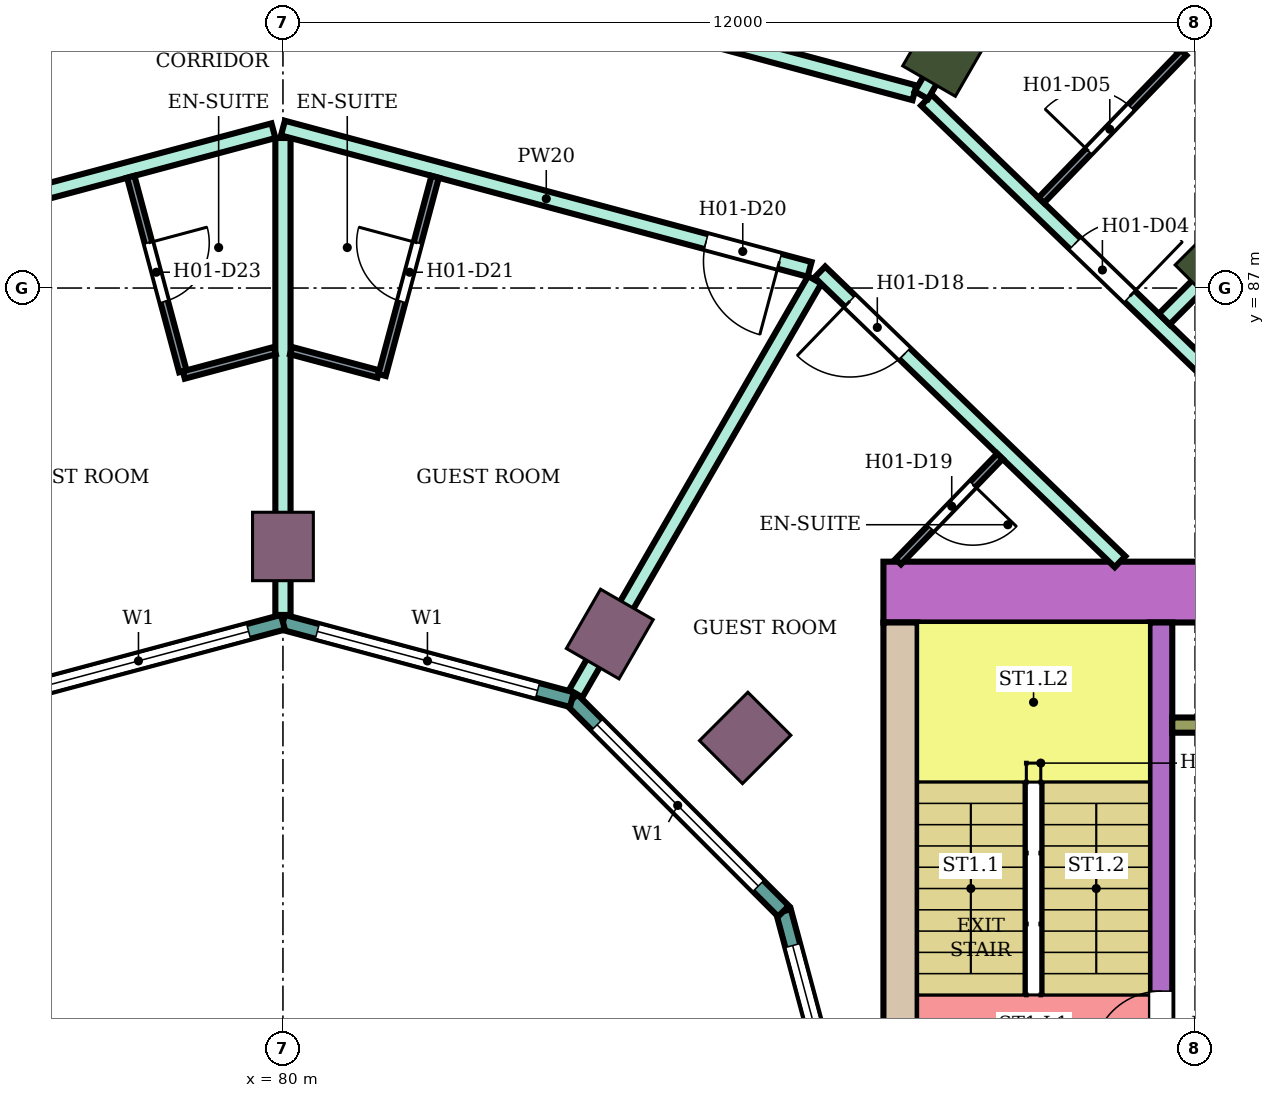
"""IFC4 building model, lengths in metres.
Left out: names, types, materials, properties, quantities, classifications, styles, units other than length and angle.
Written with IfcOpenShell. Run it as: python <this file> out.ifc"""

import sys

from ifc_helpers import new_model, si_unit, direction, frame, frame_2d, origin, origin_2d, place, context, subcontext, project, spatial, rectangle, extrude, element, fill, save


model = new_model("IFC4")
c1 = context("Model", 3, precision=1e-05, world=origin(), true_north=direction((0.0, 1.0)))
c2 = subcontext(c1, "Body", "Model", "MODEL_VIEW")
j1 = project(units=[si_unit("LENGTHUNIT", "METRE"), si_unit("PLANEANGLEUNIT", "RADIAN")], contexts=[c1])
p1 = place(None, origin())
s1 = spatial("IfcSite", under=j1, at=p1, CompositionType="ELEMENT")
p2 = place(p1, origin())
s2 = spatial("IfcBuilding", under=s1, at=p2, CompositionType="ELEMENT")
p3 = place(p2, frame((0.0, 0.0, 36.4)))
s3 = spatial("IfcBuildingStorey", under=s2, at=p3, CompositionType="ELEMENT", Elevation=36.4)
for number, where, z_axis, x_axis in (
    (1, (92.445, 87.445, 0.0), (0.0, 0.0, 1.0), (0.707, 0.707, 0.0)),
    (2, (88.8, 90.242, 0.0), (0.0, 0.0, 1.0), (0.5, 0.866, 0.0)),
):
    element("IfcColumn", number, at=place(p3, frame(where, z_axis=z_axis, x_axis=x_axis)), inside=s3, PredefinedType="COLUMN", context=c2, shape_type="SweptSolid", body=[
        extrude(rectangle(XDim=1.2, YDim=0.8, at=origin_2d()), origin(), (0.0, 0.0, 1.0), 3.8),
    ])
for number, where, z_axis, x_axis in (
    (3, (86.081, 81.081, 0.0), (0.0, 0.0, 1.0), (0.707, 0.707, 0.0)),
    (4, (84.3, 82.448, 0.0), (0.0, 0.0, 1.0), (0.5, 0.866, 0.0)),
    (5, (80.0, 83.6, 0.0), (0.0, 0.0, 1.0), (0.0, 1.0, 0.0)),
):
    element("IfcColumn", number, at=place(p3, frame(where, z_axis=z_axis, x_axis=x_axis)), inside=s3, PredefinedType="COLUMN", context=c2, shape_type="SweptSolid", body=[
        extrude(rectangle(XDim=0.9, YDim=0.8, at=origin_2d()), origin(), (0.0, 0.0, 1.0), 3.8),
    ])
p4 = place(p3, frame((87.9, 83.0, 0.0), z_axis=(0.0, 0.0, 1.0), x_axis=(1.0, 0.0, 0.0)))
e6 = element("IfcWall", 6, at=p4, inside=s3, PredefinedType="SHEAR", context=c2, shape_type="SweptSolid", body=[
    extrude(rectangle(XDim=14.7, YDim=0.8, at=frame_2d((7.35, 0.0))), origin(), (0.0, 0.0, 1.0), 3.48),
])
p5 = place(p4, frame((4.2, 0.0, 0.0)))
e7 = element("IfcOpeningElement", 7, at=p5, cuts=e6, PredefinedType="OPENING", context=c2, shape_type="SweptSolid", body=[
    extrude(rectangle(XDim=2.4, YDim=2.4, at=frame_2d((1.2, 1.2))), frame((0.0, 0.41, 0.0), z_axis=(0.0, -1.0, 0.0), x_axis=(1.0, 0.0, 0.0)), (0.0, 0.0, 1.0), 0.82),
])
p6 = place(p3, frame((88.125, 75.0, 0.0), z_axis=(0.0, 0.0, 1.0), x_axis=(0.0, 1.0, 0.0)))
e8 = element("IfcWall", 8, at=p6, inside=s3, PredefinedType="SHEAR", context=c2, shape_type="SweptSolid", body=[
    extrude(rectangle(XDim=7.6, YDim=0.45, at=frame_2d((3.8, 0.0))), origin(), (0.0, 0.0, 1.0), 3.48),
])
p7 = place(p3, frame((91.55, 75.0, 0.0), z_axis=(0.0, 0.0, 1.0), x_axis=(0.0, 1.0, 0.0)))
e9 = element("IfcWall", 9, at=p7, inside=s3, PredefinedType="SHEAR", context=c2, shape_type="SweptSolid", body=[
    extrude(rectangle(XDim=7.6, YDim=0.3, at=frame_2d((3.8, 0.0))), origin(), (0.0, 0.0, 1.0), 3.48),
])
p8 = place(p7, frame((1.85, 0.0, 0.0)))
e10 = element("IfcOpeningElement", 10, at=p8, cuts=e9, PredefinedType="OPENING", context=c2, shape_type="SweptSolid", body=[
    extrude(rectangle(XDim=0.9, YDim=2.1, at=frame_2d((0.45, 1.05))), frame((0.0, 0.16, 0.0), z_axis=(0.0, -1.0, 0.0), x_axis=(1.0, 0.0, 0.0)), (0.0, 0.0, 1.0), 0.32),
])
p9 = place(p3, frame((91.7, 81.25, 0.0), z_axis=(0.0, 0.0, 1.0), x_axis=(1.0, 0.0, 0.0)))
e11 = element("IfcWall", 11, at=p9, inside=s3, PredefinedType="SHEAR", context=c2, shape_type="SweptSolid", body=[
    extrude(rectangle(XDim=4.65, YDim=0.2, at=frame_2d((2.325, 0.0))), origin(), (0.0, 0.0, 1.0), 3.48),
])
p10 = place(p3, frame((87.604, 75.0, 0.0), z_axis=(0.0, 0.0, 1.0), x_axis=(-0.258789828301, 0.965933654434, 0.0)))
e12 = element("IfcWall", 12, at=p10, inside=s3, PredefinedType="NOTDEFINED", context=c2, shape_type="SweptSolid", body=[
    extrude(rectangle(XDim=3.936, YDim=0.2, at=frame_2d((1.968, 0.0))), origin(), (0.0, 0.0, 1.0), 3.8),
])
p11 = place(p10, frame((0.468, 0.0, 0.9)))
e13 = element("IfcOpeningElement", 13, at=p11, cuts=e12, PredefinedType="OPENING", context=c2, shape_type="SweptSolid", body=[
    extrude(rectangle(XDim=3.0, YDim=2.3, at=frame_2d((1.5, 1.15))), frame((0.0, 0.11, 0.0), z_axis=(0.0, -1.0, 0.0), x_axis=(1.0, 0.0, 0.0)), (0.0, 0.0, 1.0), 0.22),
])
p12 = place(p3, frame((86.585, 78.802, 0.0), z_axis=(0.0, 0.0, 1.0), x_axis=(-0.707106781187, 0.707106781187, 0.0)))
e14 = element("IfcWall", 14, at=p12, inside=s3, PredefinedType="NOTDEFINED", context=c2, shape_type="SweptSolid", body=[
    extrude(rectangle(XDim=3.936, YDim=0.2, at=frame_2d((1.968, 0.0))), origin(), (0.0, 0.0, 1.0), 3.8),
])
p13 = place(p12, frame((0.468, 0.0, 0.9)))
e15 = element("IfcOpeningElement", 15, at=p13, cuts=e14, PredefinedType="OPENING", context=c2, shape_type="SweptSolid", body=[
    extrude(rectangle(XDim=3.0, YDim=2.3, at=frame_2d((1.5, 1.15))), frame((0.0, 0.11, 0.0), z_axis=(0.0, -1.0, 0.0), x_axis=(1.0, 0.0, 0.0)), (0.0, 0.0, 1.0), 0.22),
])
p14 = place(p3, frame((83.802, 81.585, 0.0), z_axis=(0.0, 0.0, 1.0), x_axis=(-0.965933654434, 0.258789828301, 0.0)))
e16 = element("IfcWall", 16, at=p14, inside=s3, PredefinedType="NOTDEFINED", context=c2, shape_type="SweptSolid", body=[
    extrude(rectangle(XDim=3.936, YDim=0.2, at=frame_2d((1.968, 0.0))), origin(), (0.0, 0.0, 1.0), 3.8),
])
p15 = place(p14, frame((0.468, 0.0, 0.9)))
e17 = element("IfcOpeningElement", 17, at=p15, cuts=e16, PredefinedType="OPENING", context=c2, shape_type="SweptSolid", body=[
    extrude(rectangle(XDim=3.0, YDim=2.3, at=frame_2d((1.5, 1.15))), frame((0.0, 0.11, 0.0), z_axis=(0.0, -1.0, 0.0), x_axis=(1.0, 0.0, 0.0)), (0.0, 0.0, 1.0), 0.22),
])
p16 = place(p3, frame((80.0, 82.604, 0.0), z_axis=(0.0, 0.0, 1.0), x_axis=(-0.965933654434, -0.258789828301, 0.0)))
e18 = element("IfcWall", 18, at=p16, inside=s3, PredefinedType="NOTDEFINED", context=c2, shape_type="SweptSolid", body=[
    extrude(rectangle(XDim=3.936, YDim=0.2, at=frame_2d((1.968, 0.0))), origin(), (0.0, 0.0, 1.0), 3.8),
])
p17 = place(p16, frame((0.468, 0.0, 0.9)))
e19 = element("IfcOpeningElement", 19, at=p17, cuts=e18, PredefinedType="OPENING", context=c2, shape_type="SweptSolid", body=[
    extrude(rectangle(XDim=3.0, YDim=2.3, at=frame_2d((1.5, 1.15))), frame((0.0, 0.11, 0.0), z_axis=(0.0, -1.0, 0.0), x_axis=(1.0, 0.0, 0.0)), (0.0, 0.0, 1.0), 0.22),
])
p18 = place(p3, frame((71.614, 89.55, 0.0), z_axis=(0.0, 0.0, 1.0), x_axis=(0.965982156828, 0.258608725086, 0.0)))
e20 = element("IfcWall", 20, at=p18, inside=s3, PredefinedType="PARTITIONING", context=c2, shape_type="SweptSolid", body=[
    extrude(rectangle(XDim=8.592, YDim=0.2, at=frame_2d((4.296, 0.0))), origin(), (0.0, 0.0, 1.0), 3.35),
])
p19 = place(p18, frame((4.865, 0.0, 0.0)))
e21 = element("IfcOpeningElement", 21, at=p19, cuts=e20, PredefinedType="OPENING", context=c2, shape_type="SweptSolid", body=[
    extrude(rectangle(XDim=1.0, YDim=2.1, at=frame_2d((0.5, 1.05))), frame((0.0, 0.11, 0.0), z_axis=(0.0, -1.0, 0.0), x_axis=(1.0, 0.0, 0.0)), (0.0, 0.0, 1.0), 0.22),
])
p20 = place(p18, frame((2.804, 0.0, 0.0)))
e22 = element("IfcOpeningElement", 22, at=p20, cuts=e20, PredefinedType="OPENING", context=c2, shape_type="SweptSolid", body=[
    extrude(rectangle(XDim=1.0, YDim=2.1, at=frame_2d((0.5, 1.05))), frame((0.0, 0.11, 0.0), z_axis=(0.0, -1.0, 0.0), x_axis=(1.0, 0.0, 0.0)), (0.0, 0.0, 1.0), 0.22),
])
p21 = place(p3, frame((73.071, 87.247, 0.0), z_axis=(0.0, 0.0, 1.0), x_axis=(0.965931651205, 0.258797305243, 0.0)))
e23 = element("IfcWall", 23, at=p21, inside=s3, PredefinedType="PARTITIONING", context=c2, shape_type="SweptSolid", body=[
    extrude(rectangle(XDim=7.043, YDim=0.2, at=frame_2d((3.521, 0.0))), origin(), (0.0, 0.0, 1.0), 3.35),
])
p22 = place(p21, frame((0.41, 0.0, 0.0)))
e24 = element("IfcOpeningElement", 24, at=p22, cuts=e23, PredefinedType="OPENING", context=c2, shape_type="SweptSolid", body=[
    extrude(rectangle(XDim=1.0, YDim=2.1, at=frame_2d((0.5, 1.05))), frame((0.0, 0.11, 0.0), z_axis=(0.0, -1.0, 0.0), x_axis=(1.0, 0.0, 0.0)), (0.0, 0.0, 1.0), 0.22),
])
p23 = place(p3, frame((80.0, 82.699, 0.0), z_axis=(0.0, 0.0, 1.0), x_axis=(0.0, 1.0, 0.0)))
e25 = element("IfcWall", 25, at=p23, inside=s3, PredefinedType="PARTITIONING", context=c2, shape_type="SweptSolid", body=[
    extrude(rectangle(XDim=6.275, YDim=0.2, at=frame_2d((3.138, 0.0))), origin(), (0.0, 0.0, 1.0), 3.35),
])
p24 = place(p3, frame((80.0, 89.104, 0.0), z_axis=(0.0, 0.0, 1.0), x_axis=(0.965856548257, -0.259077455964, 0.0)))
e26 = element("IfcWall", 26, at=p24, inside=s3, PredefinedType="PARTITIONING", context=c2, shape_type="SweptSolid", body=[
    extrude(rectangle(XDim=7.173, YDim=0.2, at=frame_2d((3.586, 0.0))), origin(), (0.0, 0.0, 1.0), 3.35),
])
p25 = place(p24, frame((5.763, 0.0, 0.0)))
e27 = element("IfcOpeningElement", 27, at=p25, cuts=e26, PredefinedType="OPENING", context=c2, shape_type="SweptSolid", body=[
    extrude(rectangle(XDim=1.0, YDim=2.1, at=frame_2d((0.5, 1.05))), frame((0.0, 0.11, 0.0), z_axis=(0.0, -1.0, 0.0), x_axis=(1.0, 0.0, 0.0)), (0.0, 0.0, 1.0), 0.22),
])
p26 = place(p3, frame((80.0, 91.797, 0.0), z_axis=(0.0, 0.0, 1.0), x_axis=(0.965857042792, -0.259075612301, 0.0)))
e28 = element("IfcWall", 28, at=p26, inside=s3, PredefinedType="PARTITIONING", context=c2, shape_type="SweptSolid", body=[
    extrude(rectangle(XDim=8.602, YDim=0.2, at=frame_2d((4.301, 0.0))), origin(), (0.0, 0.0, 1.0), 3.35),
])
p27 = place(p26, frame((4.877, 0.0, 0.0)))
e29 = element("IfcOpeningElement", 29, at=p27, cuts=e28, PredefinedType="OPENING", context=c2, shape_type="SweptSolid", body=[
    extrude(rectangle(XDim=1.0, YDim=2.1, at=frame_2d((0.5, 1.05))), frame((0.0, 0.11, 0.0), z_axis=(0.0, -1.0, 0.0), x_axis=(1.0, 0.0, 0.0)), (0.0, 0.0, 1.0), 0.22),
])
p28 = place(p26, frame((2.73, 0.0, 0.0)))
e30 = element("IfcOpeningElement", 30, at=p28, cuts=e28, PredefinedType="OPENING", context=c2, shape_type="SweptSolid", body=[
    extrude(rectangle(XDim=1.1, YDim=2.1, at=frame_2d((0.55, 1.05))), frame((0.0, 0.11, 0.0), z_axis=(0.0, -1.0, 0.0), x_axis=(1.0, 0.0, 0.0)), (0.0, 0.0, 1.0), 0.22),
])
p29 = place(p3, frame((83.852, 81.665, 0.0), z_axis=(0.0, 0.0, 1.0), x_axis=(0.500253653624, 0.865878907259, 0.0)))
e31 = element("IfcWall", 31, at=p29, inside=s3, PredefinedType="PARTITIONING", context=c2, shape_type="SweptSolid", body=[
    extrude(rectangle(XDim=6.285, YDim=0.2, at=frame_2d((3.143, 0.0))), origin(), (0.0, 0.0, 1.0), 3.35),
])
p30 = place(p3, frame((87.064, 87.211, 0.0), z_axis=(0.0, 0.0, 1.0), x_axis=(0.719540958932, -0.694450004262, 0.0)))
e32 = element("IfcWall", 32, at=p30, inside=s3, PredefinedType="PARTITIONING", context=c2, shape_type="SweptSolid", body=[
    extrude(rectangle(XDim=5.488, YDim=0.2, at=frame_2d((2.744, 0.0))), origin(), (0.0, 0.0, 1.0), 3.35),
])
p31 = place(p30, frame((0.55, 0.0, 0.0)))
e33 = element("IfcOpeningElement", 33, at=p31, cuts=e32, PredefinedType="OPENING", context=c2, shape_type="SweptSolid", body=[
    extrude(rectangle(XDim=1.0, YDim=2.1, at=frame_2d((0.5, 1.05))), frame((0.0, 0.11, 0.0), z_axis=(0.0, -1.0, 0.0), x_axis=(1.0, 0.0, 0.0)), (0.0, 0.0, 1.0), 0.22),
])
p32 = place(p3, frame((88.465, 89.473, 0.0), z_axis=(0.0, 0.0, 1.0), x_axis=(0.719457552421, -0.694536413922, 0.0)))
e34 = element("IfcWall", 34, at=p32, inside=s3, PredefinedType="PARTITIONING", context=c2, shape_type="SweptSolid", body=[
    extrude(rectangle(XDim=6.524, YDim=0.2, at=frame_2d((3.262, 0.0))), origin(), (0.0, 0.0, 1.0), 3.35),
])
p33 = place(p32, frame((2.719, 0.0, 0.0)))
e35 = element("IfcOpeningElement", 35, at=p33, cuts=e34, PredefinedType="OPENING", context=c2, shape_type="SweptSolid", body=[
    extrude(rectangle(XDim=1.0, YDim=2.1, at=frame_2d((0.5, 1.05))), frame((0.0, 0.11, 0.0), z_axis=(0.0, -1.0, 0.0), x_axis=(1.0, 0.0, 0.0)), (0.0, 0.0, 1.0), 0.22),
])
p34 = place(p3, frame((88.4, 89.538, 0.0), z_axis=(0.0, 0.0, 1.0), x_axis=(0.5002401188, 0.865886726739, 0.0)))
e36 = element("IfcWall", 36, at=p34, inside=s3, PredefinedType="PARTITIONING", context=c2, shape_type="SweptSolid", body=[
    extrude(rectangle(XDim=9.008, YDim=0.2, at=frame_2d((4.504, 0.0))), origin(), (0.0, 0.0, 1.0), 3.35),
])
p35 = place(p3, frame((91.594, 86.591, 0.0), z_axis=(0.0, 0.0, 1.0), x_axis=(0.707214399597, 0.706999146394, 0.0)))
e37 = element("IfcWall", 37, at=p35, inside=s3, PredefinedType="PARTITIONING", context=c2, shape_type="SweptSolid", body=[
    extrude(rectangle(XDim=6.805, YDim=0.2, at=frame_2d((3.403, 0.0))), origin(), (0.0, 0.0, 1.0), 3.35),
])
p36 = place(p3, frame((77.998, 88.463, 0.0), z_axis=(0.0, 0.0, 1.0), x_axis=(0.258677737588, -0.965963678446, 0.0)))
e38 = element("IfcWall", 38, at=p36, inside=s3, PredefinedType="PARTITIONING", context=c2, shape_type="SweptSolid", body=[
    extrude(rectangle(XDim=2.649, YDim=0.1, at=frame_2d((1.325, 0.0))), origin(), (0.0, 0.0, 1.0), 3.35),
])
p37 = place(p36, frame((0.9, 0.0, 0.0)))
e39 = element("IfcOpeningElement", 39, at=p37, cuts=e38, PredefinedType="OPENING", context=c2, shape_type="SweptSolid", body=[
    extrude(rectangle(XDim=0.8, YDim=2.1, at=frame_2d((0.4, 1.05))), frame((0.0, 0.06, 0.0), z_axis=(0.0, -1.0, 0.0), x_axis=(1.0, 0.0, 0.0)), (0.0, 0.0, 1.0), 0.12),
])
p38 = place(p3, frame((78.696, 85.856, 0.0), z_axis=(0.0, 0.0, 1.0), x_axis=(0.966002513606, 0.258532674351, 0.0)))
e40 = element("IfcWall", 40, at=p38, inside=s3, PredefinedType="PARTITIONING", context=c2, shape_type="SweptSolid", body=[
    extrude(rectangle(XDim=1.24, YDim=0.1, at=frame_2d((0.62, 0.0))), origin(), (0.0, 0.0, 1.0), 3.35),
])
p39 = place(p3, frame((80.106, 86.177, 0.0), z_axis=(0.0, 0.0, 1.0), x_axis=(0.966002973184, -0.258530957139, 0.0)))
e41 = element("IfcWall", 41, at=p39, inside=s3, PredefinedType="PARTITIONING", context=c2, shape_type="SweptSolid", body=[
    extrude(rectangle(XDim=1.19, YDim=0.1, at=frame_2d((0.595, 0.0))), origin(), (0.0, 0.0, 1.0), 3.35),
])
p40 = place(p3, frame((81.304, 85.856, 0.0), z_axis=(0.0, 0.0, 1.0), x_axis=(0.25867580527, 0.965964195904, 0.0)))
e42 = element("IfcWall", 42, at=p40, inside=s3, PredefinedType="PARTITIONING", context=c2, shape_type="SweptSolid", body=[
    extrude(rectangle(XDim=2.699, YDim=0.1, at=frame_2d((1.35, 0.0))), origin(), (0.0, 0.0, 1.0), 3.35),
])
p41 = place(p40, frame((1.0, 0.0, 0.0)))
e43 = element("IfcOpeningElement", 43, at=p41, cuts=e42, PredefinedType="OPENING", context=c2, shape_type="SweptSolid", body=[
    extrude(rectangle(XDim=0.8, YDim=2.1, at=frame_2d((0.4, 1.05))), frame((0.0, 0.06, 0.0), z_axis=(0.0, -1.0, 0.0), x_axis=(1.0, 0.0, 0.0)), (0.0, 0.0, 1.0), 0.12),
])
p42 = place(p3, frame((88.095, 83.4, 0.0), z_axis=(0.0, 0.0, 1.0), x_axis=(0.694447472534, 0.719543402368, 0.0)))
e44 = element("IfcWall", 44, at=p42, inside=s3, PredefinedType="PARTITIONING", context=c2, shape_type="SweptSolid", body=[
    extrude(rectangle(XDim=1.926, YDim=0.1, at=frame_2d((0.963, 0.0))), origin(), (0.0, 0.0, 1.0), 3.35),
])
p43 = place(p42, frame((0.613, 0.0, 0.0)))
e45 = element("IfcOpeningElement", 45, at=p43, cuts=e44, PredefinedType="OPENING", context=c2, shape_type="SweptSolid", body=[
    extrude(rectangle(XDim=0.8, YDim=2.1, at=frame_2d((0.4, 1.05))), frame((0.0, 0.06, 0.0), z_axis=(0.0, -1.0, 0.0), x_axis=(1.0, 0.0, 0.0)), (0.0, 0.0, 1.0), 0.12),
])
p44 = place(p3, frame((89.925, 91.956, 0.0), z_axis=(0.0, 0.0, 1.0), x_axis=(0.71935982196, -0.694637636865, 0.0)))
e46 = element("IfcWall", 46, at=p44, inside=s3, PredefinedType="PARTITIONING", context=c2, shape_type="SweptSolid", body=[
    extrude(rectangle(XDim=2.627, YDim=0.1, at=frame_2d((1.313, 0.0))), origin(), (0.0, 0.0, 1.0), 3.35),
])
p45 = place(p3, frame((89.976, 88.154, 0.0), z_axis=(0.0, 0.0, 1.0), x_axis=(0.6945137956, 0.719479386585, 0.0)))
e47 = element("IfcWall", 47, at=p45, inside=s3, PredefinedType="PARTITIONING", context=c2, shape_type="SweptSolid", body=[
    extrude(rectangle(XDim=2.699, YDim=0.1, at=frame_2d((1.35, 0.0))), origin(), (0.0, 0.0, 1.0), 3.35),
])
p46 = place(p45, frame((0.9, 0.0, 0.0)))
e48 = element("IfcOpeningElement", 48, at=p46, cuts=e47, PredefinedType="OPENING", context=c2, shape_type="SweptSolid", body=[
    extrude(rectangle(XDim=0.8, YDim=2.1, at=frame_2d((0.4, 1.05))), frame((0.0, 0.06, 0.0), z_axis=(0.0, -1.0, 0.0), x_axis=(1.0, 0.0, 0.0)), (0.0, 0.0, 1.0), 0.12),
])
p47 = place(p11, origin())
e49 = element("IfcWindow", 49, at=p47, inside=s3, PartitioningType="SINGLE_PANEL", PredefinedType="WINDOW", context=c2, shape_type="SweptSolid", body=[
    extrude(rectangle(XDim=3.0, YDim=2.3, at=frame_2d((1.5, 1.15))), frame((0.0, 0.03, 0.0), z_axis=(0.0, -1.0, 0.0), x_axis=(1.0, 0.0, 0.0)), (0.0, 0.0, 1.0), 0.06),
])
fill(e13, e49)
p48 = place(p13, origin())
e50 = element("IfcWindow", 50, at=p48, inside=s3, PartitioningType="SINGLE_PANEL", PredefinedType="WINDOW", context=c2, shape_type="SweptSolid", body=[
    extrude(rectangle(XDim=3.0, YDim=2.3, at=frame_2d((1.5, 1.15))), frame((0.0, 0.03, 0.0), z_axis=(0.0, -1.0, 0.0), x_axis=(1.0, 0.0, 0.0)), (0.0, 0.0, 1.0), 0.06),
])
fill(e15, e50)
p49 = place(p15, origin())
e51 = element("IfcWindow", 51, at=p49, inside=s3, PartitioningType="SINGLE_PANEL", PredefinedType="WINDOW", context=c2, shape_type="SweptSolid", body=[
    extrude(rectangle(XDim=3.0, YDim=2.3, at=frame_2d((1.5, 1.15))), frame((0.0, 0.03, 0.0), z_axis=(0.0, -1.0, 0.0), x_axis=(1.0, 0.0, 0.0)), (0.0, 0.0, 1.0), 0.06),
])
fill(e17, e51)
p50 = place(p17, origin())
e52 = element("IfcWindow", 52, at=p50, inside=s3, PartitioningType="SINGLE_PANEL", PredefinedType="WINDOW", context=c2, shape_type="SweptSolid", body=[
    extrude(rectangle(XDim=3.0, YDim=2.3, at=frame_2d((1.5, 1.15))), frame((0.0, 0.03, 0.0), z_axis=(0.0, -1.0, 0.0), x_axis=(1.0, 0.0, 0.0)), (0.0, 0.0, 1.0), 0.06),
])
fill(e19, e52)
p51 = place(p33, origin())
e53 = element("IfcDoor", 53, at=p51, inside=s3, OperationType="SINGLE_SWING_RIGHT", PredefinedType="DOOR", context=c2, shape_type="SweptSolid", body=[
    extrude(rectangle(XDim=1.0, YDim=2.1, at=frame_2d((0.5, 1.05))), frame((0.0, 0.025, 0.0), z_axis=(0.0, -1.0, 0.0), x_axis=(1.0, 0.0, 0.0)), (0.0, 0.0, 1.0), 0.05),
])
fill(e35, e53)
p52 = place(p46, origin())
e54 = element("IfcDoor", 54, at=p52, inside=s3, OperationType="SINGLE_SWING_LEFT", PredefinedType="DOOR", context=c2, shape_type="SweptSolid", body=[
    extrude(rectangle(XDim=0.8, YDim=2.1, at=frame_2d((0.4, 1.05))), frame((0.0, 0.025, 0.0), z_axis=(0.0, -1.0, 0.0), x_axis=(1.0, 0.0, 0.0)), (0.0, 0.0, 1.0), 0.05),
])
fill(e48, e54)
p53 = place(p31, frame((1.0, 0.0, 0.0), z_axis=(0.0, 0.0, 1.0), x_axis=(-1.0, 0.0, 0.0)))
e55 = element("IfcDoor", 55, at=p53, inside=s3, OperationType="SINGLE_SWING_RIGHT", PredefinedType="DOOR", context=c2, shape_type="SweptSolid", body=[
    extrude(rectangle(XDim=1.0, YDim=2.1, at=frame_2d((0.5, 1.05))), frame((0.0, 0.025, 0.0), z_axis=(0.0, -1.0, 0.0), x_axis=(1.0, 0.0, 0.0)), (0.0, 0.0, 1.0), 0.05),
])
fill(e33, e55)
p54 = place(p43, frame((0.8, 0.0, 0.0), z_axis=(0.0, 0.0, 1.0), x_axis=(-1.0, 0.0, 0.0)))
e56 = element("IfcDoor", 56, at=p54, inside=s3, OperationType="SINGLE_SWING_LEFT", PredefinedType="DOOR", context=c2, shape_type="SweptSolid", body=[
    extrude(rectangle(XDim=0.8, YDim=2.1, at=frame_2d((0.4, 1.05))), frame((0.0, 0.025, 0.0), z_axis=(0.0, -1.0, 0.0), x_axis=(1.0, 0.0, 0.0)), (0.0, 0.0, 1.0), 0.05),
])
fill(e45, e56)
p55 = place(p25, frame((1.0, 0.0, 0.0), z_axis=(0.0, 0.0, 1.0), x_axis=(-1.0, 0.0, 0.0)))
e57 = element("IfcDoor", 57, at=p55, inside=s3, OperationType="SINGLE_SWING_LEFT", PredefinedType="DOOR", context=c2, shape_type="SweptSolid", body=[
    extrude(rectangle(XDim=1.0, YDim=2.1, at=frame_2d((0.5, 1.05))), frame((0.0, 0.025, 0.0), z_axis=(0.0, -1.0, 0.0), x_axis=(1.0, 0.0, 0.0)), (0.0, 0.0, 1.0), 0.05),
])
fill(e27, e57)
p56 = place(p41, origin())
e58 = element("IfcDoor", 58, at=p56, inside=s3, OperationType="SINGLE_SWING_RIGHT", PredefinedType="DOOR", context=c2, shape_type="SweptSolid", body=[
    extrude(rectangle(XDim=0.8, YDim=2.1, at=frame_2d((0.4, 1.05))), frame((0.0, 0.025, 0.0), z_axis=(0.0, -1.0, 0.0), x_axis=(1.0, 0.0, 0.0)), (0.0, 0.0, 1.0), 0.05),
])
fill(e43, e58)
p57 = place(p37, origin())
e59 = element("IfcDoor", 59, at=p57, inside=s3, OperationType="SINGLE_SWING_LEFT", PredefinedType="DOOR", context=c2, shape_type="SweptSolid", body=[
    extrude(rectangle(XDim=0.8, YDim=2.1, at=frame_2d((0.4, 1.05))), frame((0.0, 0.025, 0.0), z_axis=(0.0, -1.0, 0.0), x_axis=(1.0, 0.0, 0.0)), (0.0, 0.0, 1.0), 0.05),
])
fill(e39, e59)
p58 = place(p8, origin())
e60 = element("IfcDoor", 60, at=p58, inside=s3, OperationType="SINGLE_SWING_LEFT", PredefinedType="DOOR", context=c2, shape_type="SweptSolid", body=[
    extrude(rectangle(XDim=0.9, YDim=2.1, at=frame_2d((0.45, 1.05))), frame((0.0, 0.025, 0.0), z_axis=(0.0, -1.0, 0.0), x_axis=(1.0, 0.0, 0.0)), (0.0, 0.0, 1.0), 0.05),
])
fill(e10, e60)
save(model, sys.argv[1])
